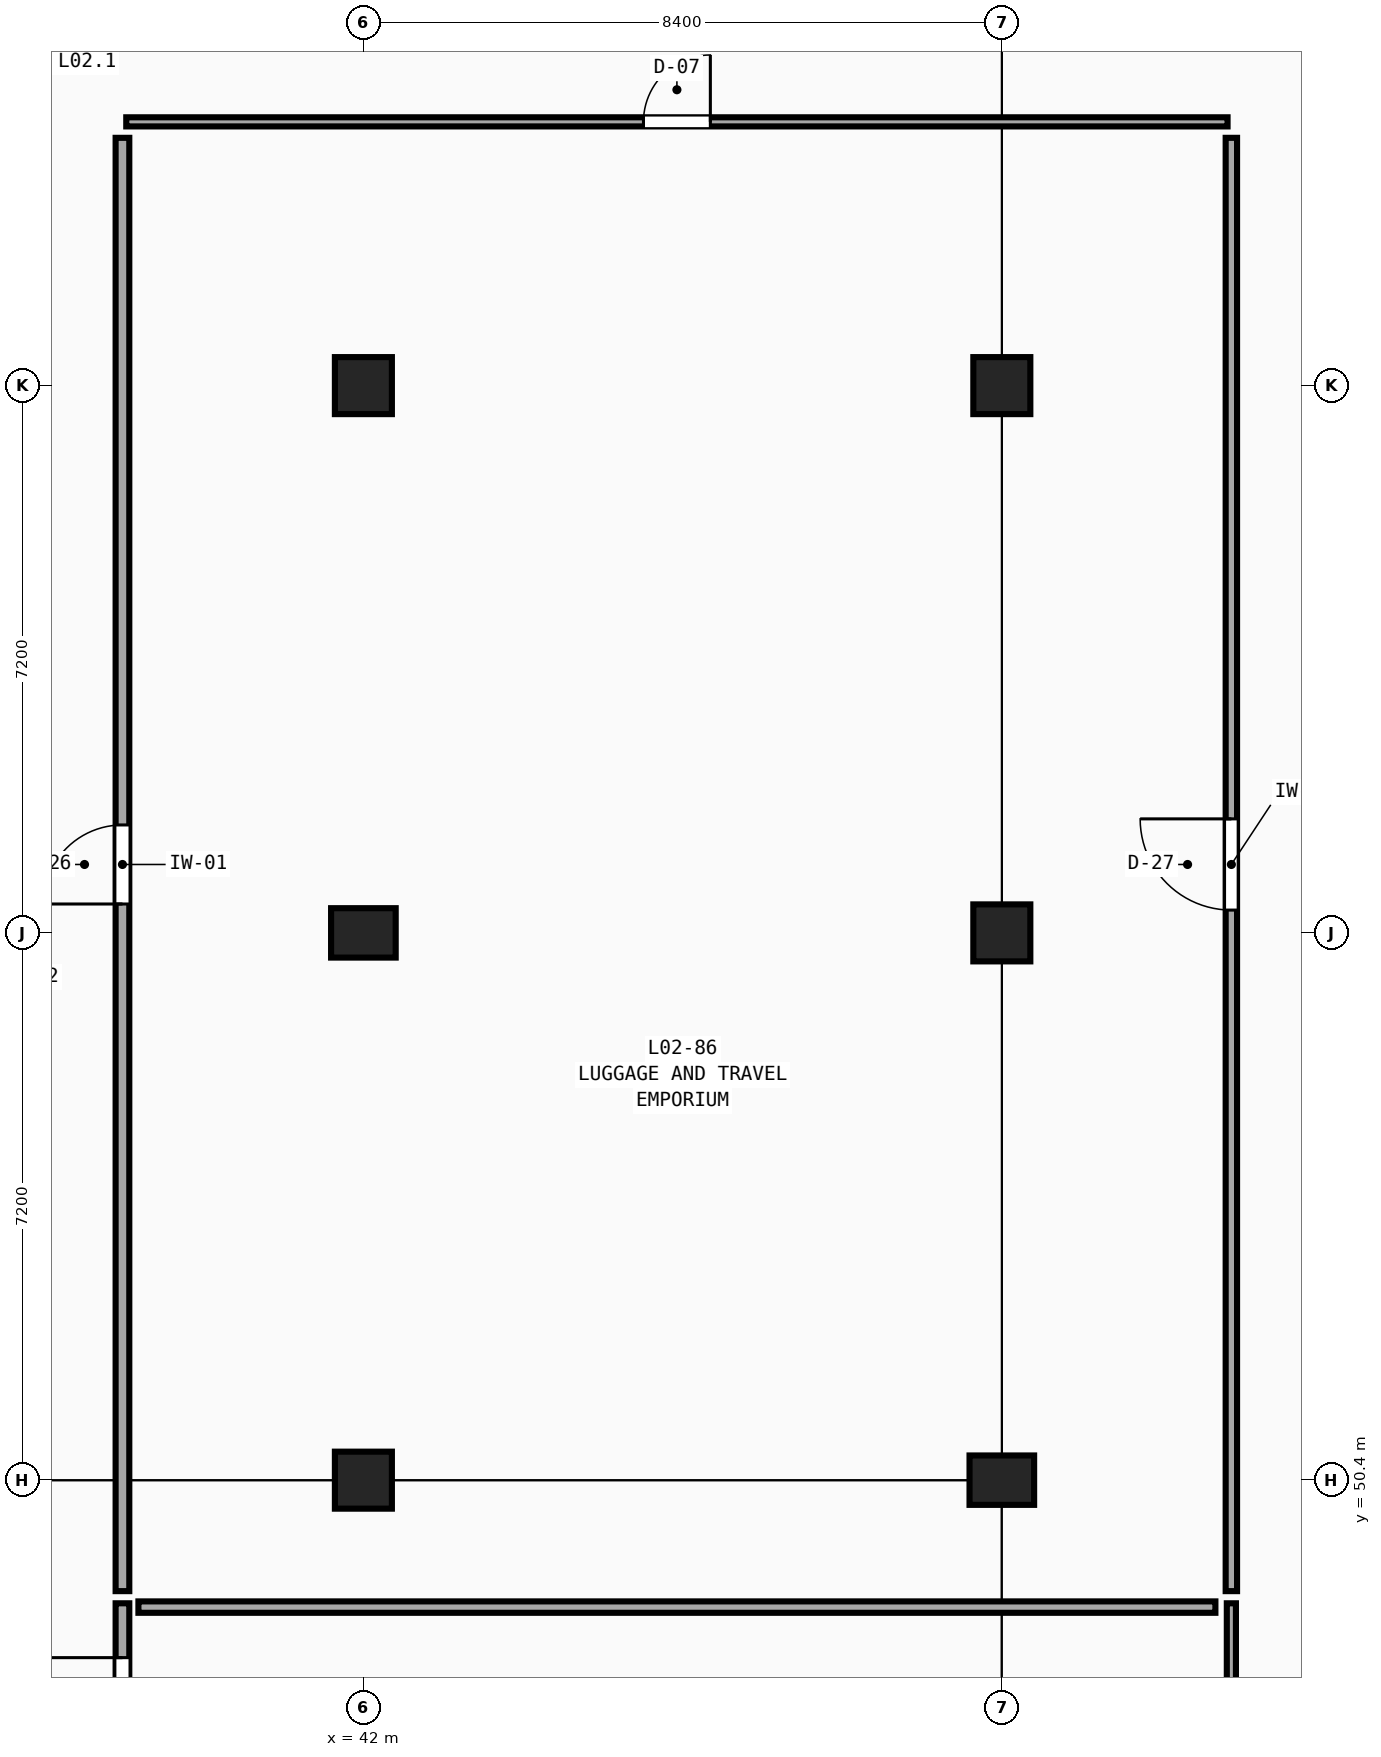
"""IFC4 building model, lengths in metres.
Left out: names, types, materials, properties, quantities, classifications, styles, units other than length and angle.
Written with IfcOpenShell. Run it as: python <this file> out.ifc"""

import sys

from ifc_helpers import new_model, si_unit, direction, frame, frame_2d, origin, origin_2d, place, context, subcontext, project, spatial, rectangle, extrude, element, fill, save


model = new_model("IFC4")
c1 = context("Model", 3, precision=1e-05, world=origin(), true_north=direction((0.0, 1.0)))
c2 = subcontext(c1, "Body", "Model", "MODEL_VIEW")
j1 = project(units=[si_unit("LENGTHUNIT", "METRE"), si_unit("PLANEANGLEUNIT", "RADIAN")], contexts=[c1])
p1 = place(None, origin())
s1 = spatial("IfcSite", under=j1, at=p1, CompositionType="ELEMENT")
p2 = place(p1, origin())
s2 = spatial("IfcBuilding", under=s1, at=p2, CompositionType="ELEMENT")
p3 = place(p2, frame((0.0, 0.0, 9.9)))
s3 = spatial("IfcBuildingStorey", under=s2, at=p3, CompositionType="ELEMENT", Elevation=9.9)
p4 = place(p3, frame((42.0, 50.4, 0.0), z_axis=(0.0, 0.0, 1.0), x_axis=(1.0, 0.0, 0.0)))
e1 = element("IfcColumn", 1, at=p4, inside=s3, PredefinedType="COLUMN", context=c2, shape_type="SweptSolid", body=[
    extrude(rectangle(XDim=0.75, YDim=0.75, at=origin_2d()), origin(), (0.0, 0.0, 1.0), 4.5),
])
p5 = place(p3, frame((42.0, 57.6, 0.0), z_axis=(0.0, 0.0, 1.0), x_axis=(1.0, 0.0, 0.0)))
e2 = element("IfcColumn", 2, at=p5, inside=s3, PredefinedType="COLUMN", context=c2, shape_type="SweptSolid", body=[
    extrude(rectangle(XDim=0.85, YDim=0.65, at=origin_2d()), origin(), (0.0, 0.0, 1.0), 4.5),
])
p6 = place(p3, frame((42.0, 64.8, 0.0), z_axis=(0.0, 0.0, 1.0), x_axis=(1.0, 0.0, 0.0)))
e3 = element("IfcColumn", 3, at=p6, inside=s3, PredefinedType="COLUMN", context=c2, shape_type="SweptSolid", body=[
    extrude(rectangle(XDim=0.75, YDim=0.75, at=origin_2d()), origin(), (0.0, 0.0, 1.0), 4.5),
])
p7 = place(p3, frame((50.4, 50.4, 0.0), z_axis=(0.0, 0.0, 1.0), x_axis=(1.0, 0.0, 0.0)))
e4 = element("IfcColumn", 4, at=p7, inside=s3, PredefinedType="COLUMN", context=c2, shape_type="SweptSolid", body=[
    extrude(rectangle(XDim=0.85, YDim=0.65, at=origin_2d()), origin(), (0.0, 0.0, 1.0), 4.5),
])
for number, where, z_axis, x_axis in (
    (5, (50.4, 57.6, 0.0), (0.0, 0.0, 1.0), (1.0, 0.0, 0.0)),
    (6, (50.4, 64.8, 0.0), (0.0, 0.0, 1.0), (1.0, 0.0, 0.0)),
):
    element("IfcColumn", number, at=place(p3, frame(where, z_axis=z_axis, x_axis=x_axis)), inside=s3, PredefinedType="COLUMN", context=c2, shape_type="SweptSolid", body=[
        extrude(rectangle(XDim=0.75, YDim=0.75, at=origin_2d()), origin(), (0.0, 0.0, 1.0), 4.5),
    ])
p8 = place(p3, frame((53.42, 27.33, 0.0), z_axis=(0.0, 0.0, 1.0), x_axis=(0.0, 1.0, 0.0)))
e7 = element("IfcWall", 7, at=p8, inside=s3, PredefinedType="PARTITIONING", context=c2, shape_type="SweptSolid", body=[
    extrude(rectangle(XDim=21.45, YDim=0.12, at=frame_2d((10.725, 0.0))), origin(), (0.0, 0.0, 1.0), 4.18),
])
p9 = place(p8, frame((10.045, 0.0, 0.0)))
e8 = element("IfcOpeningElement", 8, at=p9, cuts=e7, PredefinedType="OPENING", context=c2, shape_type="SweptSolid", body=[
    extrude(rectangle(XDim=1.36, YDim=2.29, at=frame_2d((0.68, 1.145))), frame((0.0, 0.08, 0.0), z_axis=(0.0, -1.0, 0.0), x_axis=(1.0, 0.0, 0.0)), (0.0, 0.0, 1.0), 0.16),
])
p10 = place(p3, frame((38.83, 48.94, 0.0), z_axis=(0.0, 0.0, 1.0), x_axis=(0.0, 1.0, 0.0)))
e9 = element("IfcWall", 9, at=p10, inside=s3, PredefinedType="PARTITIONING", context=c2, shape_type="SweptSolid", body=[
    extrude(rectangle(XDim=19.12, YDim=0.18, at=frame_2d((9.56, 0.0))), origin(), (0.0, 0.0, 1.0), 4.18),
])
p11 = place(p10, frame((9.04, 0.0, 0.0)))
e10 = element("IfcOpeningElement", 10, at=p11, cuts=e9, PredefinedType="OPENING", context=c2, shape_type="SweptSolid", body=[
    extrude(rectangle(XDim=1.04, YDim=2.37, at=frame_2d((0.52, 1.185))), frame((0.0, 0.11, 0.0), z_axis=(0.0, -1.0, 0.0), x_axis=(1.0, 0.0, 0.0)), (0.0, 0.0, 1.0), 0.22),
])
p12 = place(p3, frame((53.42, 48.94, 0.0), z_axis=(0.0, 0.0, 1.0), x_axis=(0.0, 1.0, 0.0)))
e11 = element("IfcWall", 11, at=p12, inside=s3, PredefinedType="PARTITIONING", context=c2, shape_type="SweptSolid", body=[
    extrude(rectangle(XDim=19.12, YDim=0.15, at=frame_2d((9.56, 0.0))), origin(), (0.0, 0.0, 1.0), 4.18),
])
p13 = place(p12, frame((8.96, 0.0, 0.0)))
e12 = element("IfcOpeningElement", 12, at=p13, cuts=e11, PredefinedType="OPENING", context=c2, shape_type="SweptSolid", body=[
    extrude(rectangle(XDim=1.2, YDim=2.37, at=frame_2d((0.6, 1.185))), frame((0.0, 0.095, 0.0), z_axis=(0.0, -1.0, 0.0), x_axis=(1.0, 0.0, 0.0)), (0.0, 0.0, 1.0), 0.19),
])
p14 = place(p3, frame((38.88, 68.27, 0.0), z_axis=(0.0, 0.0, 1.0), x_axis=(1.0, 0.0, 0.0)))
e13 = element("IfcWall", 13, at=p14, inside=s3, PredefinedType="PARTITIONING", context=c2, shape_type="SweptSolid", body=[
    extrude(rectangle(XDim=14.49, YDim=0.12, at=frame_2d((7.245, 0.0))), origin(), (0.0, 0.0, 1.0), 4.18),
])
p15 = place(p14, frame((6.805, 0.0, 0.0)))
e14 = element("IfcOpeningElement", 14, at=p15, cuts=e13, PredefinedType="OPENING", context=c2, shape_type="SweptSolid", body=[
    extrude(rectangle(XDim=0.88, YDim=2.13, at=frame_2d((0.44, 1.065))), frame((0.0, 0.08, 0.0), z_axis=(0.0, -1.0, 0.0), x_axis=(1.0, 0.0, 0.0)), (0.0, 0.0, 1.0), 0.16),
])
p16 = place(p3, frame((38.83, 45.83, 0.0), z_axis=(0.0, 0.0, 1.0), x_axis=(0.0, 1.0, 0.0)))
e15 = element("IfcWall", 15, at=p16, inside=s3, PredefinedType="PARTITIONING", context=c2, shape_type="SweptSolid", body=[
    extrude(rectangle(XDim=2.95, YDim=0.18, at=frame_2d((1.475, 0.0))), origin(), (0.0, 0.0, 1.0), 4.18),
])
p17 = place(p16, frame((0.715, 0.0, 0.0)))
e16 = element("IfcOpeningElement", 16, at=p17, cuts=e15, PredefinedType="OPENING", context=c2, shape_type="SweptSolid", body=[
    extrude(rectangle(XDim=1.52, YDim=2.21, at=frame_2d((0.76, 1.105))), frame((0.0, 0.11, 0.0), z_axis=(0.0, -1.0, 0.0), x_axis=(1.0, 0.0, 0.0)), (0.0, 0.0, 1.0), 0.22),
])
p18 = place(p3, frame((39.04, 48.73, 0.0), z_axis=(0.0, 0.0, 1.0), x_axis=(1.0, 0.0, 0.0)))
e17 = element("IfcWall", 17, at=p18, inside=s3, PredefinedType="PARTITIONING", context=c2, shape_type="SweptSolid", body=[
    extrude(rectangle(XDim=14.17, YDim=0.15, at=frame_2d((7.085, 0.0))), origin(), (0.0, 0.0, 1.0), 4.18),
])
p19 = place(p11, origin())
e18 = element("IfcDoor", 18, at=p19, inside=s3, OperationType="SINGLE_SWING_LEFT", PredefinedType="DOOR", context=c2, shape_type="SweptSolid", body=[
    extrude(rectangle(XDim=1.04, YDim=2.37, at=frame_2d((0.52, 1.185))), frame((0.0, 0.025, 0.0), z_axis=(0.0, -1.0, 0.0), x_axis=(1.0, 0.0, 0.0)), (0.0, 0.0, 1.0), 0.05),
])
fill(e10, e18)
p20 = place(p13, origin())
e19 = element("IfcDoor", 19, at=p20, inside=s3, OperationType="SINGLE_SWING_RIGHT", PredefinedType="DOOR", context=c2, shape_type="SweptSolid", body=[
    extrude(rectangle(XDim=1.2, YDim=2.37, at=frame_2d((0.6, 1.185))), frame((0.0, 0.025, 0.0), z_axis=(0.0, -1.0, 0.0), x_axis=(1.0, 0.0, 0.0)), (0.0, 0.0, 1.0), 0.05),
])
fill(e12, e19)
p21 = place(p15, origin())
e20 = element("IfcDoor", 20, at=p21, inside=s3, OperationType="SINGLE_SWING_RIGHT", PredefinedType="DOOR", context=c2, shape_type="SweptSolid", body=[
    extrude(rectangle(XDim=0.88, YDim=2.13, at=frame_2d((0.44, 1.065))), frame((0.0, 0.025, 0.0), z_axis=(0.0, -1.0, 0.0), x_axis=(1.0, 0.0, 0.0)), (0.0, 0.0, 1.0), 0.05),
])
fill(e14, e20)
p22 = place(p17, origin())
e21 = element("IfcDoor", 21, at=p22, inside=s3, OperationType="SINGLE_SWING_RIGHT", PredefinedType="DOOR", context=c2, shape_type="SweptSolid", body=[
    extrude(rectangle(XDim=1.52, YDim=2.21, at=frame_2d((0.76, 1.105))), frame((0.0, 0.025, 0.0), z_axis=(0.0, -1.0, 0.0), x_axis=(1.0, 0.0, 0.0)), (0.0, 0.0, 1.0), 0.05),
])
fill(e16, e21)
save(model, sys.argv[1])
